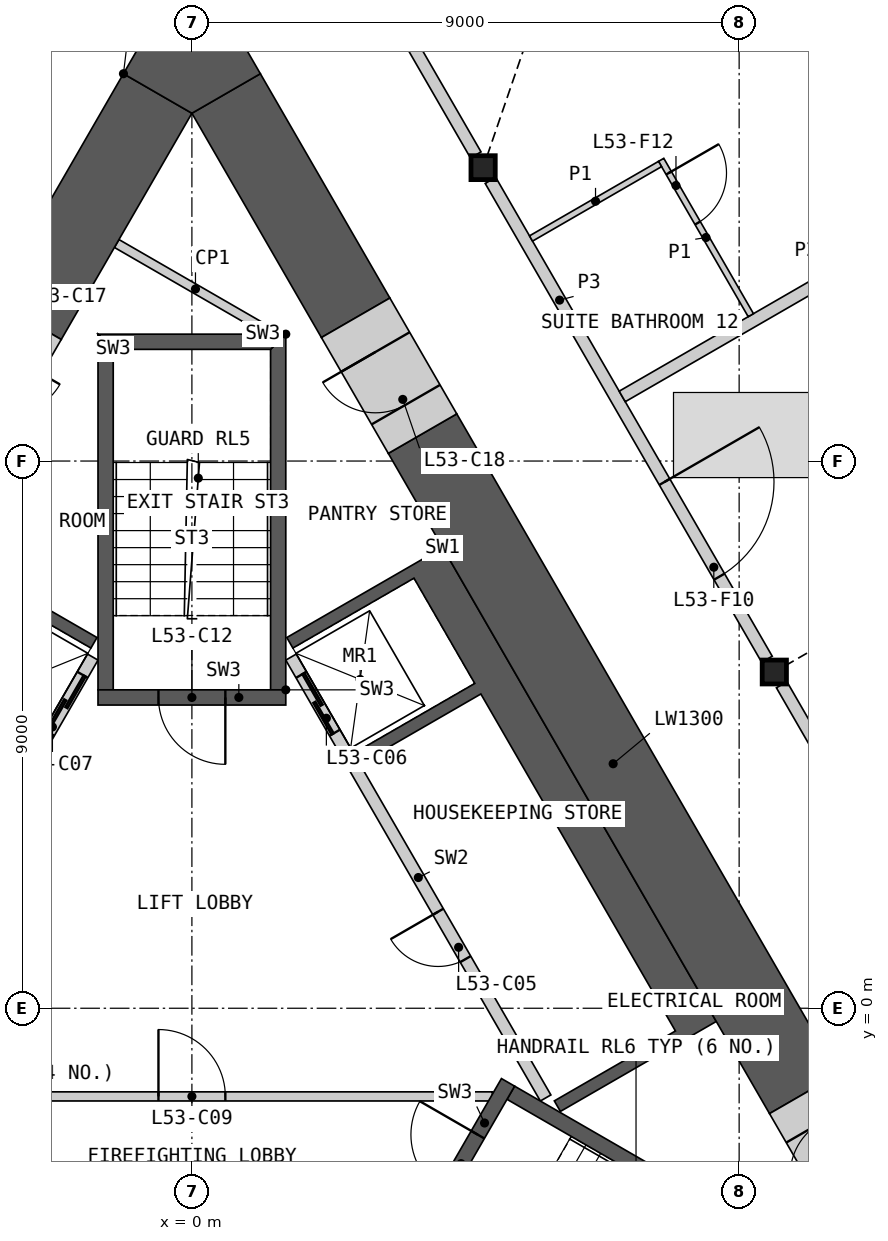
"""IFC4 building model, lengths in metres.
Left out: names, types, materials, properties, quantities, classifications, styles, units other than length and angle.
Written with IfcOpenShell. Run it as: python <this file> out.ifc"""

import sys

from ifc_helpers import new_model, si_unit, direction, frame, frame_2d, origin, origin_2d, place, context, subcontext, project, spatial, polyline, rectangle, i_section, outline, extrude, element, fill, save


model = new_model("IFC4")
c1 = context("Model", 3, precision=1e-05, world=origin(), true_north=direction((0.0, 1.0)))
c2 = subcontext(c1, "Body", "Model", "MODEL_VIEW")
j1 = project(units=[si_unit("LENGTHUNIT", "METRE"), si_unit("PLANEANGLEUNIT", "RADIAN")], contexts=[c1])
p1 = place(None, origin())
s1 = spatial("IfcSite", under=j1, at=p1, CompositionType="ELEMENT")
p2 = place(p1, origin())
s2 = spatial("IfcBuilding", under=s1, at=p2, CompositionType="ELEMENT")
p3 = place(p2, frame((0.0, 0.0, 241.8)))
s3 = spatial("IfcBuildingStorey", under=s2, at=p3, CompositionType="ELEMENT", Elevation=241.8)
for number, where, z_axis, x_axis in (
    (1, (9.578, 5.53, 0.0), (0.0, 0.0, 1.0), (1.0, 0.0, 0.0)),
    (2, (4.789, 13.825, 0.0), (0.0, 0.0, 1.0), (1.0, 0.0, 0.0)),
):
    element("IfcColumn", number, at=place(p3, frame(where, z_axis=z_axis, x_axis=x_axis)), inside=s3, PredefinedType="COLUMN", context=c2, shape_type="SweptSolid", body=[
        extrude(i_section(OverallWidth=0.399, OverallDepth=0.393, WebThickness=0.023, FlangeThickness=0.037, at=origin_2d()), origin(), (0.0, 0.0, 1.0), 3.6),
    ])
p4 = place(p3, origin())
e3 = element("IfcWall", 3, at=p4, inside=s3, PredefinedType="SHEAR", context=c2, shape_type="SweptSolid", body=[
    extrude(outline(polyline([(4.124, 7.577), (8.624, -0.217), (8.231, -0.444), (6.061, -1.697), (5.96, -1.524), (7.952, -0.374), (4.752, 5.169), (2.76, 4.019), (2.66, 4.192), (4.652, 5.342), (3.652, 7.074), (1.66, 5.924), (1.561, 6.097), (3.731, 7.35), (4.124, 7.577)])), origin(), (0.0, 0.0, 1.0), 3.25),
])
p5 = place(p3, frame((5.817, -1.476, 0.0), z_axis=(0.0, 0.0, 1.0), x_axis=(-0.500002616675, 0.866023893041, 0.0)))
e4 = element("IfcWall", 4, at=p5, inside=s3, PredefinedType="SOLIDWALL", context=c2, shape_type="SweptSolid", body=[
    extrude(rectangle(XDim=8.373, YDim=0.2, at=frame_2d((4.187, 0.0))), origin(), (0.0, 0.0, 1.0), 3.25),
])
p6 = place(p5, frame((2.637, 0.0, 0.0)))
e5 = element("IfcOpeningElement", 5, at=p6, cuts=e4, PredefinedType="OPENING", context=c2, shape_type="SweptSolid", body=[
    extrude(rectangle(XDim=0.9, YDim=2.1, at=frame_2d((0.45, 1.05))), frame((0.0, 0.11, 0.0), z_axis=(0.0, -1.0, 0.0), x_axis=(1.0, 0.0, 0.0)), (0.0, 0.0, 1.0), 0.22),
])
p7 = place(p5, frame((6.937, 0.0, 0.0)))
e6 = element("IfcOpeningElement", 6, at=p7, cuts=e4, PredefinedType="OPENING", context=c2, shape_type="SweptSolid", body=[
    extrude(rectangle(XDim=1.1, YDim=2.1, at=frame_2d((0.55, 1.05))), frame((0.0, 0.11, 0.0), z_axis=(0.0, -1.0, 0.0), x_axis=(1.0, 0.0, 0.0)), (0.0, 0.0, 1.0), 0.22),
])
p8 = place(p3, origin())
e7 = element("IfcWall", 7, at=p8, inside=s3, PredefinedType="SHEAR", context=c2, shape_type="SweptSolid", body=[
    extrude(outline(polyline([(-7.524, 1.688), (-4.124, 7.577), (-3.731, 7.35), (-1.561, 6.097), (-1.66, 5.924), (-3.652, 7.074), (-4.652, 5.342), (-2.66, 4.192), (-2.76, 4.019), (-4.752, 5.169), (-5.752, 3.437), (-3.76, 2.287), (-3.861, 2.113), (-5.852, 3.263), (-6.852, 1.531), (-4.861, 0.381), (-4.96, 0.208), (-7.131, 1.461), (-7.524, 1.688)])), origin(), (0.0, 0.0, 1.0), 3.25),
])
p9 = place(p3, frame((-1.631, 5.776, 0.0), z_axis=(0.0, 0.0, 1.0), x_axis=(-0.499992876559, -0.866029516466, 0.0)))
e8 = element("IfcWall", 8, at=p9, inside=s3, PredefinedType="SOLIDWALL", context=c2, shape_type="SweptSolid", body=[
    extrude(rectangle(XDim=6.486, YDim=0.2, at=frame_2d((3.243, 0.0))), origin(), (0.0, 0.0, 1.0), 3.25),
])
p10 = place(p9, frame((0.337, 0.0, 0.0)))
e9 = element("IfcOpeningElement", 9, at=p10, cuts=e8, PredefinedType="OPENING", context=c2, shape_type="SweptSolid", body=[
    extrude(rectangle(XDim=1.1, YDim=2.1, at=frame_2d((0.55, 1.05))), frame((0.0, 0.11, 0.0), z_axis=(0.0, -1.0, 0.0), x_axis=(1.0, 0.0, 0.0)), (0.0, 0.0, 1.0), 0.22),
])
p11 = place(p9, frame((2.537, 0.0, 0.0)))
e10 = element("IfcOpeningElement", 10, at=p11, cuts=e8, PredefinedType="OPENING", context=c2, shape_type="SweptSolid", body=[
    extrude(rectangle(XDim=1.1, YDim=2.1, at=frame_2d((0.55, 1.05))), frame((0.0, 0.11, 0.0), z_axis=(0.0, -1.0, 0.0), x_axis=(1.0, 0.0, 0.0)), (0.0, 0.0, 1.0), 0.22),
])
p12 = place(p3, frame((-4.941, -1.45, 0.0), z_axis=(0.0, 0.0, 1.0), x_axis=(1.0, 0.0, 0.0)))
e11 = element("IfcWall", 11, at=p12, inside=s3, PredefinedType="PARTITIONING", context=c2, shape_type="SweptSolid", body=[
    extrude(rectangle(XDim=9.882, YDim=0.15, at=frame_2d((4.941, 0.0))), origin(), (0.0, 0.0, 1.0), 3.25),
])
p13 = place(p12, frame((4.391, 0.0, 0.0)))
e12 = element("IfcOpeningElement", 12, at=p13, cuts=e11, PredefinedType="OPENING", context=c2, shape_type="SweptSolid", body=[
    extrude(rectangle(XDim=1.1, YDim=2.1, at=frame_2d((0.55, 1.05))), frame((0.0, 0.085, 0.0), z_axis=(0.0, -1.0, 0.0), x_axis=(1.0, 0.0, 0.0)), (0.0, 0.0, 1.0), 0.17),
])
p14 = place(p3, origin())
e13 = element("IfcWall", 13, at=p14, inside=s3, PredefinedType="SHEAR", context=c2, shape_type="SweptSolid", body=[
    extrude(outline(polyline([(10.032, -4.298), (10.374, -4.206), (5.307, -1.281), (5.182, -1.498), (10.032, -4.298)])), origin(), (0.0, 0.0, 1.0), 3.25),
])
p15 = place(p3, frame((3.655, -3.893, 0.0), z_axis=(0.0, 0.0, 1.0), x_axis=(0.499982516597, 0.866035497597, 0.0)))
e14 = element("IfcWall", 14, at=p15, inside=s3, PredefinedType="SHEAR", context=c2, shape_type="SweptSolid", body=[
    extrude(rectangle(XDim=3.088, YDim=0.25, at=frame_2d((1.544, 0.0))), origin(), (0.0, 0.0, 1.0), 3.25),
])
p16 = place(p15, frame((0.994, 0.0, 0.0)))
e15 = element("IfcOpeningElement", 15, at=p16, cuts=e14, PredefinedType="OPENING", context=c2, shape_type="SweptSolid", body=[
    extrude(rectangle(XDim=1.1, YDim=2.1, at=frame_2d((0.55, 1.05))), frame((0.0, 0.135, 0.0), z_axis=(0.0, -1.0, 0.0), x_axis=(1.0, 0.0, 0.0)), (0.0, 0.0, 1.0), 0.27),
])
p17 = place(p3, origin())
e16 = element("IfcWall", 16, at=p17, inside=s3, PredefinedType="SHEAR", context=c2, shape_type="SweptSolid", body=[
    extrude(outline(polyline([(1.544, 5.237), (1.544, 11.087), (1.294, 10.837), (1.294, 5.237), (1.544, 5.237)])), origin(), (0.0, 0.0, 1.0), 3.25),
])
p18 = place(p3, origin())
e17 = element("IfcWall", 17, at=p18, inside=s3, PredefinedType="SHEAR", context=c2, shape_type="SweptSolid", body=[
    extrude(outline(polyline([(1.544, 11.087), (-1.544, 11.087), (-1.294, 10.837), (1.294, 10.837), (1.544, 11.087)])), origin(), (0.0, 0.0, 1.0), 3.25),
])
p19 = place(p3, origin())
e18 = element("IfcWall", 18, at=p19, inside=s3, PredefinedType="SHEAR", context=c2, shape_type="SweptSolid", body=[
    extrude(outline(polyline([(-1.294, 10.837), (-1.544, 11.087), (-1.544, 5.237), (-1.294, 5.237), (-1.294, 10.837)])), origin(), (0.0, 0.0, 1.0), 3.25),
])
p20 = place(p3, frame((1.544, 5.112, 0.0), z_axis=(0.0, 0.0, 1.0), x_axis=(-1.0, 0.0, 0.0)))
e19 = element("IfcWall", 19, at=p20, inside=s3, PredefinedType="SHEAR", context=c2, shape_type="SweptSolid", body=[
    extrude(rectangle(XDim=3.088, YDim=0.25, at=frame_2d((1.544, 0.0))), origin(), (0.0, 0.0, 1.0), 3.25),
])
p21 = place(p20, frame((0.994, 0.0, 0.0)))
e20 = element("IfcOpeningElement", 20, at=p21, cuts=e19, PredefinedType="OPENING", context=c2, shape_type="SweptSolid", body=[
    extrude(rectangle(XDim=1.1, YDim=2.1, at=frame_2d((0.55, 1.05))), frame((0.0, 0.135, 0.0), z_axis=(0.0, -1.0, 0.0), x_axis=(1.0, 0.0, 0.0)), (0.0, 0.0, 1.0), 0.27),
])
p22 = place(p3, frame((-1.237, 12.578, 0.0), z_axis=(0.0, 0.0, 1.0), x_axis=(0.866045649925, -0.499964931016, 0.0)))
e21 = element("IfcWall", 21, at=p22, inside=s3, PredefinedType="PARTITIONING", context=c2, shape_type="SweptSolid", body=[
    extrude(rectangle(XDim=2.992, YDim=0.15, at=frame_2d((1.496, 0.0))), origin(), (0.0, 0.0, 1.0), 3.25),
])
p23 = place(p3, frame((10.062, -1.408, 0.0), z_axis=(0.0, 0.0, 1.0), x_axis=(-0.500000545805, 0.866025088663, 0.0)))
e22 = element("IfcWall", 22, at=p23, inside=s3, PredefinedType="SHEAR", context=c2, shape_type="SweptSolid", body=[
    extrude(rectangle(XDim=12.539, YDim=1.3, at=frame_2d((6.27, 0.0))), origin(), (0.0, 0.0, 1.0), 3.25),
])
p24 = place(p3, frame((2.693, 11.356, 0.0), z_axis=(0.0, 0.0, 1.0), x_axis=(-0.50002837164, 0.866009022791, 0.0)))
e23 = element("IfcWall", 23, at=p24, inside=s3, PredefinedType="SHEAR", context=c2, shape_type="SweptSolid", body=[
    extrude(rectangle(XDim=4.26, YDim=1.3, at=frame_2d((2.13, 0.0))), origin(), (0.0, 0.0, 1.0), 3.25),
])
p25 = place(p3, frame((-0.563, 15.045, 0.0), z_axis=(0.0, 0.0, 1.0), x_axis=(-0.499994567278, -0.866028540345, 0.0)))
e24 = element("IfcWall", 24, at=p25, inside=s3, PredefinedType="SHEAR", context=c2, shape_type="SweptSolid", body=[
    extrude(rectangle(XDim=4.297, YDim=1.3, at=frame_2d((2.149, 0.0))), origin(), (0.0, 0.0, 1.0), 3.25),
])
p26 = place(p3, origin())
e25 = element("IfcWall", 25, at=p26, inside=s3, PredefinedType="SHEAR", context=c2, shape_type="SweptSolid", body=[
    extrude(outline(polyline([(-1.126, 15.371), (0.0, 17.321), (1.126, 15.371), (0.0, 14.72), (-1.126, 15.371)])), origin(), (0.0, 0.0, 1.0), 3.25),
])
p27 = place(p3, frame((11.163, -3.313, 0.0), z_axis=(0.0, 0.0, 1.0), x_axis=(-0.50002983664, 0.866008176907, 0.0)))
e26 = element("IfcWall", 26, at=p27, inside=s3, PredefinedType="SHEAR", context=c2, shape_type="SweptSolid", body=[
    extrude(rectangle(XDim=2.2, YDim=1.3, at=frame_2d((1.1, 0.0))), origin(), (0.0, 0.0, 1.0), 3.25),
])
p28 = place(p27, frame((0.65, 0.0, 0.0)))
e27 = element("IfcOpeningElement", 27, at=p28, cuts=e26, PredefinedType="OPENING", context=c2, shape_type="SweptSolid", body=[
    extrude(rectangle(XDim=1.0, YDim=2.1, at=frame_2d((0.5, 1.05))), frame((0.0, 0.66, 0.0), z_axis=(0.0, -1.0, 0.0), x_axis=(1.0, 0.0, 0.0)), (0.0, 0.0, 1.0), 1.32),
])
p29 = place(p3, frame((-2.712, 11.324, 0.0), z_axis=(0.0, 0.0, 1.0), x_axis=(-0.499946605688, -0.86605622881, 0.0)))
e28 = element("IfcWall", 28, at=p29, inside=s3, PredefinedType="SHEAR", context=c2, shape_type="SweptSolid", body=[
    extrude(rectangle(XDim=2.2, YDim=1.3, at=frame_2d((1.1, 0.0))), origin(), (0.0, 0.0, 1.0), 3.25),
])
p30 = place(p29, frame((0.65, 0.0, 0.0)))
e29 = element("IfcOpeningElement", 29, at=p30, cuts=e28, PredefinedType="OPENING", context=c2, shape_type="SweptSolid", body=[
    extrude(rectangle(XDim=1.0, YDim=2.1, at=frame_2d((0.5, 1.05))), frame((0.0, 0.66, 0.0), z_axis=(0.0, -1.0, 0.0), x_axis=(1.0, 0.0, 0.0)), (0.0, 0.0, 1.0), 1.32),
])
p31 = place(p3, frame((3.793, 9.451, 0.0), z_axis=(0.0, 0.0, 1.0), x_axis=(-0.499946605688, 0.86605622881, 0.0)))
e30 = element("IfcWall", 30, at=p31, inside=s3, PredefinedType="SHEAR", context=c2, shape_type="SweptSolid", body=[
    extrude(rectangle(XDim=2.2, YDim=1.3, at=frame_2d((1.1, 0.0))), origin(), (0.0, 0.0, 1.0), 3.25),
])
p32 = place(p31, frame((0.55, 0.0, 0.0)))
e31 = element("IfcOpeningElement", 31, at=p32, cuts=e30, PredefinedType="OPENING", context=c2, shape_type="SweptSolid", body=[
    extrude(rectangle(XDim=1.0, YDim=2.1, at=frame_2d((0.5, 1.05))), frame((0.0, 0.66, 0.0), z_axis=(0.0, -1.0, 0.0), x_axis=(1.0, 0.0, 0.0)), (0.0, 0.0, 1.0), 1.32),
])
p33 = place(p3, frame((9.699, 5.321, 0.0), z_axis=(0.0, 0.0, 1.0), x_axis=(0.49998193945, -0.866035830797, 0.0)))
e32 = element("IfcWall", 32, at=p33, inside=s3, PredefinedType="PARTITIONING", context=c2, shape_type="SweptSolid", body=[
    extrude(rectangle(XDim=9.094, YDim=0.2, at=frame_2d((4.547, 0.0))), origin(), (0.0, 0.0, 1.0), 3.25),
])
p34 = place(p3, frame((4.91, 13.616, 0.0), z_axis=(0.0, 0.0, 1.0), x_axis=(0.50000207303, -0.866024206917, 0.0)))
e33 = element("IfcWall", 33, at=p34, inside=s3, PredefinedType="PARTITIONING", context=c2, shape_type="SweptSolid", body=[
    extrude(rectangle(XDim=9.095, YDim=0.2, at=frame_2d((4.547, 0.0))), origin(), (0.0, 0.0, 1.0), 3.25),
])
p35 = place(p34, frame((5.726, 0.0, 0.0)))
e34 = element("IfcOpeningElement", 34, at=p35, cuts=e33, PredefinedType="OPENING", context=c2, shape_type="SweptSolid", body=[
    extrude(rectangle(XDim=1.8, YDim=2.1, at=frame_2d((0.9, 1.05))), frame((0.0, 0.11, 0.0), z_axis=(0.0, -1.0, 0.0), x_axis=(1.0, 0.0, 0.0)), (0.0, 0.0, 1.0), 0.22),
])
p36 = place(p3, frame((-4.668, 14.035, 0.0), z_axis=(0.0, 0.0, 1.0), x_axis=(0.499984524817, 0.866034338201, 0.0)))
e35 = element("IfcWall", 35, at=p36, inside=s3, PredefinedType="PARTITIONING", context=c2, shape_type="SweptSolid", body=[
    extrude(rectangle(XDim=5.51, YDim=0.2, at=frame_2d((2.755, 0.0))), origin(), (0.0, 0.0, 1.0), 3.25),
])
p37 = place(p36, frame((4.01, 0.0, 0.0)))
e36 = element("IfcOpeningElement", 36, at=p37, cuts=e35, PredefinedType="OPENING", context=c2, shape_type="SweptSolid", body=[
    extrude(rectangle(XDim=1.1, YDim=2.1, at=frame_2d((0.55, 1.05))), frame((0.0, 0.11, 0.0), z_axis=(0.0, -1.0, 0.0), x_axis=(1.0, 0.0, 0.0)), (0.0, 0.0, 1.0), 0.22),
])
p38 = place(p3, frame((1.913, 18.807, 0.0), z_axis=(0.0, 0.0, 1.0), x_axis=(0.499984524817, -0.866034338201, 0.0)))
e37 = element("IfcWall", 37, at=p38, inside=s3, PredefinedType="PARTITIONING", context=c2, shape_type="SweptSolid", body=[
    extrude(rectangle(XDim=5.51, YDim=0.2, at=frame_2d((2.755, 0.0))), origin(), (0.0, 0.0, 1.0), 3.25),
])
p39 = place(p38, frame((0.35, 0.0, 0.0)))
e38 = element("IfcOpeningElement", 38, at=p39, cuts=e37, PredefinedType="OPENING", context=c2, shape_type="SweptSolid", body=[
    extrude(rectangle(XDim=1.1, YDim=2.1, at=frame_2d((0.55, 1.05))), frame((0.0, 0.11, 0.0), z_axis=(0.0, -1.0, 0.0), x_axis=(1.0, 0.0, 0.0)), (0.0, 0.0, 1.0), 0.22),
])
p40 = place(p3, frame((7.077, 10.062, 0.0), z_axis=(0.0, 0.0, 1.0), x_axis=(0.866041764179, 0.499971661894, 0.0)))
e39 = element("IfcWall", 39, at=p40, inside=s3, PredefinedType="PARTITIONING", context=c2, shape_type="SweptSolid", body=[
    extrude(rectangle(XDim=7.632, YDim=0.2, at=frame_2d((3.816, 0.0))), origin(), (0.0, 0.0, 1.0), 2.404),
])
p41 = place(p3, frame((7.717, 13.954, 0.0), z_axis=(0.0, 0.0, 1.0), x_axis=(0.500001826776, -0.866024349092, 0.0)))
e40 = element("IfcWall", 40, at=p41, inside=s3, PredefinedType="PARTITIONING", context=c2, shape_type="SweptSolid", body=[
    extrude(rectangle(XDim=2.95, YDim=0.1, at=frame_2d((1.475, 0.0))), origin(), (0.0, 0.0, 1.0), 2.404),
])
p42 = place(p41, frame((0.25, 0.0, 0.0)))
e41 = element("IfcOpeningElement", 41, at=p42, cuts=e40, PredefinedType="OPENING", context=c2, shape_type="SweptSolid", body=[
    extrude(rectangle(XDim=0.95, YDim=2.1, at=frame_2d((0.475, 1.05))), frame((0.0, 0.06, 0.0), z_axis=(0.0, -1.0, 0.0), x_axis=(1.0, 0.0, 0.0)), (0.0, 0.0, 1.0), 0.12),
])
p43 = place(p3, frame((5.577, 12.66, 0.0), z_axis=(0.0, 0.0, 1.0), x_axis=(0.866014668023, 0.500018594424, 0.0)))
e42 = element("IfcWall", 42, at=p43, inside=s3, PredefinedType="PARTITIONING", context=c2, shape_type="SweptSolid", body=[
    extrude(rectangle(XDim=2.45, YDim=0.1, at=frame_2d((1.225, 0.0))), origin(), (0.0, 0.0, 1.0), 2.404),
])
p44 = place(p6, origin())
e43 = element("IfcDoor", 43, at=p44, inside=s3, OperationType="SINGLE_SWING_RIGHT", PredefinedType="DOOR", context=c2, shape_type="SweptSolid", body=[
    extrude(rectangle(XDim=0.9, YDim=2.1, at=frame_2d((0.45, 1.05))), frame((0.0, 0.025, 0.0), z_axis=(0.0, -1.0, 0.0), x_axis=(1.0, 0.0, 0.0)), (0.0, 0.0, 1.0), 0.05),
])
fill(e5, e43)
p45 = place(p7, origin())
e44 = element("IfcDoor", 44, at=p45, inside=s3, OperationType="SLIDING_TO_LEFT", PredefinedType="DOOR", context=c2, shape_type="SweptSolid", body=[
    extrude(rectangle(XDim=1.1, YDim=2.1, at=frame_2d((0.55, 1.05))), frame((0.0, 0.025, 0.0), z_axis=(0.0, -1.0, 0.0), x_axis=(1.0, 0.0, 0.0)), (0.0, 0.0, 1.0), 0.05),
])
fill(e6, e44)
p46 = place(p10, origin())
e45 = element("IfcDoor", 45, at=p46, inside=s3, OperationType="SLIDING_TO_LEFT", PredefinedType="DOOR", context=c2, shape_type="SweptSolid", body=[
    extrude(rectangle(XDim=1.1, YDim=2.1, at=frame_2d((0.55, 1.05))), frame((0.0, 0.025, 0.0), z_axis=(0.0, -1.0, 0.0), x_axis=(1.0, 0.0, 0.0)), (0.0, 0.0, 1.0), 0.05),
])
fill(e9, e45)
p47 = place(p13, origin())
e46 = element("IfcDoor", 46, at=p47, inside=s3, OperationType="SINGLE_SWING_LEFT", PredefinedType="DOOR", context=c2, shape_type="SweptSolid", body=[
    extrude(rectangle(XDim=1.1, YDim=2.1, at=frame_2d((0.55, 1.05))), frame((0.0, 0.025, 0.0), z_axis=(0.0, -1.0, 0.0), x_axis=(1.0, 0.0, 0.0)), (0.0, 0.0, 1.0), 0.05),
])
fill(e12, e46)
p48 = place(p16, origin())
e47 = element("IfcDoor", 47, at=p48, inside=s3, OperationType="SINGLE_SWING_RIGHT", PredefinedType="DOOR", context=c2, shape_type="SweptSolid", body=[
    extrude(rectangle(XDim=1.1, YDim=2.1, at=frame_2d((0.55, 1.05))), frame((0.0, 0.025, 0.0), z_axis=(0.0, -1.0, 0.0), x_axis=(1.0, 0.0, 0.0)), (0.0, 0.0, 1.0), 0.05),
])
fill(e15, e47)
p49 = place(p21, origin())
e48 = element("IfcDoor", 48, at=p49, inside=s3, OperationType="SINGLE_SWING_LEFT", PredefinedType="DOOR", context=c2, shape_type="SweptSolid", body=[
    extrude(rectangle(XDim=1.1, YDim=2.1, at=frame_2d((0.55, 1.05))), frame((0.0, 0.025, 0.0), z_axis=(0.0, -1.0, 0.0), x_axis=(1.0, 0.0, 0.0)), (0.0, 0.0, 1.0), 0.05),
])
fill(e20, e48)
p50 = place(p28, origin())
e49 = element("IfcDoor", 49, at=p50, inside=s3, OperationType="SINGLE_SWING_LEFT", PredefinedType="DOOR", context=c2, shape_type="SweptSolid", body=[
    extrude(rectangle(XDim=1.0, YDim=2.1, at=frame_2d((0.5, 1.05))), frame((0.0, 0.405, 0.0), z_axis=(0.0, -1.0, 0.0), x_axis=(1.0, 0.0, 0.0)), (0.0, 0.0, 1.0), 0.05),
])
fill(e27, e49)
p51 = place(p32, origin())
e50 = element("IfcDoor", 50, at=p51, inside=s3, OperationType="SINGLE_SWING_RIGHT", PredefinedType="DOOR", context=c2, shape_type="SweptSolid", body=[
    extrude(rectangle(XDim=1.0, YDim=2.1, at=frame_2d((0.5, 1.05))), frame((0.0, 0.405, 0.0), z_axis=(0.0, -1.0, 0.0), x_axis=(1.0, 0.0, 0.0)), (0.0, 0.0, 1.0), 0.05),
])
fill(e31, e50)
p52 = place(p35, origin())
e51 = element("IfcDoor", 51, at=p52, inside=s3, OperationType="DOUBLE_DOOR_SINGLE_SWING", PredefinedType="DOOR", context=c2, shape_type="SweptSolid", body=[
    extrude(rectangle(XDim=1.8, YDim=2.1, at=frame_2d((0.9, 1.05))), frame((0.0, 0.025, 0.0), z_axis=(0.0, -1.0, 0.0), x_axis=(1.0, 0.0, 0.0)), (0.0, 0.0, 1.0), 0.05),
])
fill(e34, e51)
p53 = place(p42, origin())
e52 = element("IfcDoor", 52, at=p53, inside=s3, OperationType="SINGLE_SWING_LEFT", PredefinedType="DOOR", context=c2, shape_type="SweptSolid", body=[
    extrude(rectangle(XDim=0.95, YDim=2.1, at=frame_2d((0.475, 1.05))), frame((0.0, 0.025, 0.0), z_axis=(0.0, -1.0, 0.0), x_axis=(1.0, 0.0, 0.0)), (0.0, 0.0, 1.0), 0.05),
])
fill(e41, e52)
save(model, sys.argv[1])
